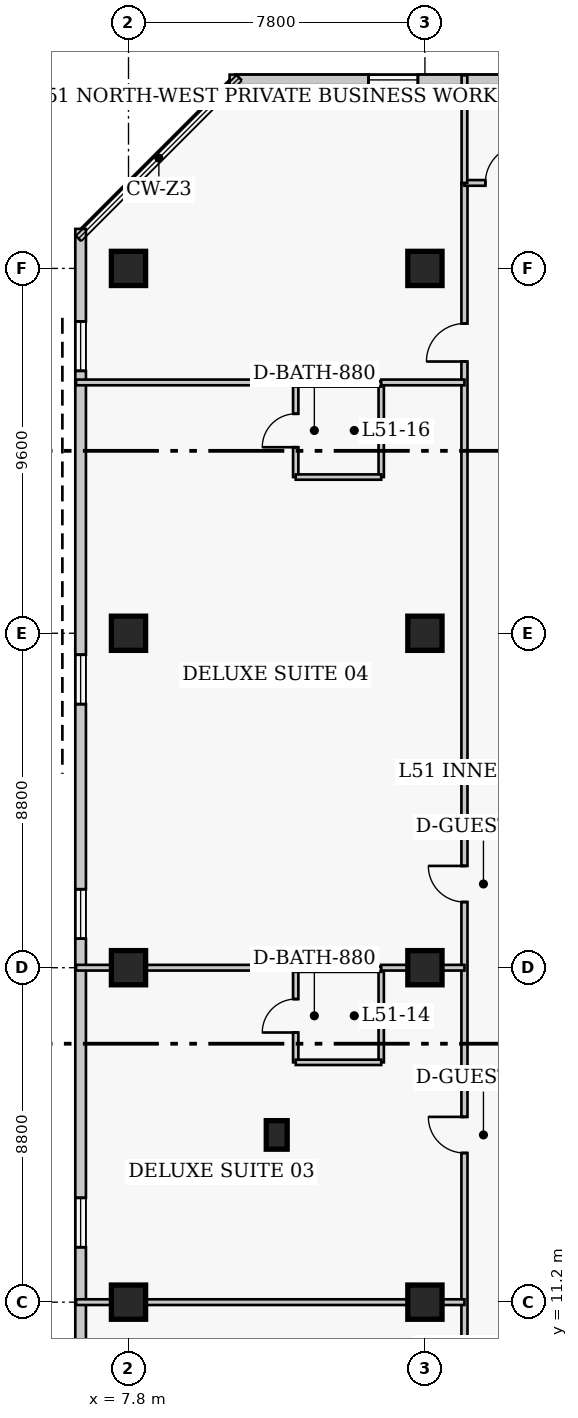
"""IFC4 building model, lengths in metres.
Left out: names, types, materials, properties, quantities, classifications, styles, units other than length and angle.
Written with IfcOpenShell. Run it as: python <this file> out.ifc"""

import sys

from ifc_helpers import new_model, si_unit, direction, frame, frame_2d, origin, origin_2d, place, context, subcontext, project, spatial, rectangle, extrude, element, fill, save


model = new_model("IFC4")
c1 = context("Model", 3, precision=1e-05, world=origin(), true_north=direction((0.0, 1.0)))
c2 = subcontext(c1, "Body", "Model", "MODEL_VIEW")
j1 = project(units=[si_unit("LENGTHUNIT", "METRE"), si_unit("PLANEANGLEUNIT", "RADIAN")], contexts=[c1])
p1 = place(None, origin())
s1 = spatial("IfcSite", under=j1, at=p1, CompositionType="ELEMENT")
p2 = place(p1, origin())
s2 = spatial("IfcBuilding", under=s1, at=p2, CompositionType="ELEMENT")
p3 = place(p2, frame((0.0, 0.0, 204.6)))
s3 = spatial("IfcBuildingStorey", under=s2, at=p3, CompositionType="ELEMENT", Elevation=204.6)
for number, where, z_axis, x_axis in (
    (1, (7.8, 11.2, 0.0), (0.0, 0.0, 1.0), (1.0, 0.0, 0.0)),
    (2, (7.8, 20.0, 0.0), (0.0, 0.0, 1.0), (1.0, 0.0, 0.0)),
    (3, (7.8, 28.8, 0.0), (0.0, 0.0, 1.0), (1.0, 0.0, 0.0)),
    (4, (7.8, 38.4, 0.0), (0.0, 0.0, 1.0), (1.0, 0.0, 0.0)),
    (5, (15.6, 11.2, 0.0), (0.0, 0.0, 1.0), (1.0, 0.0, 0.0)),
    (6, (15.6, 20.0, 0.0), (0.0, 0.0, 1.0), (1.0, 0.0, 0.0)),
    (7, (15.6, 28.8, 0.0), (0.0, 0.0, 1.0), (1.0, 0.0, 0.0)),
    (8, (15.6, 38.4, 0.0), (0.0, 0.0, 1.0), (1.0, 0.0, 0.0)),
):
    element("IfcColumn", number, at=place(p3, frame(where, z_axis=z_axis, x_axis=x_axis)), inside=s3, PredefinedType="COLUMN", context=c2, shape_type="SweptSolid", body=[
        extrude(rectangle(XDim=0.9, YDim=0.9, at=origin_2d()), origin(), (0.0, 0.0, 1.0), 3.9),
    ])
p4 = place(p3, frame((11.7, 15.6, 0.0), z_axis=(0.0, 0.0, 1.0), x_axis=(1.0, 0.0, 0.0)))
e9 = element("IfcColumn", 9, at=p4, inside=s3, PredefinedType="PILASTER", context=c2, shape_type="SweptSolid", body=[
    extrude(rectangle(XDim=0.55, YDim=0.75, at=origin_2d()), origin(), (0.0, 0.0, 1.0), 3.9),
])
p5 = place(p3, frame((36.29, 43.36, 0.0), z_axis=(0.0, 0.0, 1.0), x_axis=(-1.0, 0.0, 0.0)))
e10 = element("IfcWall", 10, at=p5, inside=s3, PredefinedType="SOLIDWALL", context=c2, shape_type="SweptSolid", body=[
    extrude(rectangle(XDim=25.83, YDim=0.28, at=frame_2d((12.915, 0.0))), origin(), (0.0, 0.0, 1.0), 3.65),
])
p6 = place(p5, frame((3.005, 0.0, 0.85)))
e11 = element("IfcOpeningElement", 11, at=p6, cuts=e10, PredefinedType="OPENING", context=c2, shape_type="SweptSolid", body=[
    extrude(rectangle(XDim=1.3, YDim=1.7, at=frame_2d((0.65, 0.85))), frame((0.0, 0.15, 0.0), z_axis=(0.0, -1.0, 0.0), x_axis=(1.0, 0.0, 0.0)), (0.0, 0.0, 1.0), 0.3),
])
p7 = place(p5, frame((12.265, 0.0, 0.85)))
e12 = element("IfcOpeningElement", 12, at=p7, cuts=e10, PredefinedType="OPENING", context=c2, shape_type="SweptSolid", body=[
    extrude(rectangle(XDim=1.3, YDim=1.7, at=frame_2d((0.65, 0.85))), frame((0.0, 0.15, 0.0), z_axis=(0.0, -1.0, 0.0), x_axis=(1.0, 0.0, 0.0)), (0.0, 0.0, 1.0), 0.3),
])
p8 = place(p5, frame((20.875, 0.0, 0.85)))
e13 = element("IfcOpeningElement", 13, at=p8, cuts=e10, PredefinedType="OPENING", context=c2, shape_type="SweptSolid", body=[
    extrude(rectangle(XDim=1.3, YDim=1.7, at=frame_2d((0.65, 0.85))), frame((0.0, 0.15, 0.0), z_axis=(0.0, -1.0, 0.0), x_axis=(1.0, 0.0, 0.0)), (0.0, 0.0, 1.0), 0.3),
])
p9 = place(p3, frame((6.54, 39.44, 0.0), z_axis=(0.0, 0.0, 1.0), x_axis=(0.0, -1.0, 0.0)))
e14 = element("IfcWall", 14, at=p9, inside=s3, PredefinedType="SOLIDWALL", context=c2, shape_type="SweptSolid", body=[
    extrude(rectangle(XDim=29.88, YDim=0.28, at=frame_2d((14.94, 0.0))), origin(), (0.0, 0.0, 1.0), 3.65),
])
p10 = place(p9, frame((2.435, 0.0, 0.85)))
e15 = element("IfcOpeningElement", 15, at=p10, cuts=e14, PredefinedType="OPENING", context=c2, shape_type="SweptSolid", body=[
    extrude(rectangle(XDim=1.3, YDim=1.7, at=frame_2d((0.65, 0.85))), frame((0.0, 0.15, 0.0), z_axis=(0.0, -1.0, 0.0), x_axis=(1.0, 0.0, 0.0)), (0.0, 0.0, 1.0), 0.3),
])
p11 = place(p9, frame((11.205, 0.0, 0.85)))
e16 = element("IfcOpeningElement", 16, at=p11, cuts=e14, PredefinedType="OPENING", context=c2, shape_type="SweptSolid", body=[
    extrude(rectangle(XDim=1.3, YDim=1.7, at=frame_2d((0.65, 0.85))), frame((0.0, 0.15, 0.0), z_axis=(0.0, -1.0, 0.0), x_axis=(1.0, 0.0, 0.0)), (0.0, 0.0, 1.0), 0.3),
])
p12 = place(p9, frame((17.375, 0.0, 0.85)))
e17 = element("IfcOpeningElement", 17, at=p12, cuts=e14, PredefinedType="OPENING", context=c2, shape_type="SweptSolid", body=[
    extrude(rectangle(XDim=1.3, YDim=1.7, at=frame_2d((0.65, 0.85))), frame((0.0, 0.15, 0.0), z_axis=(0.0, -1.0, 0.0), x_axis=(1.0, 0.0, 0.0)), (0.0, 0.0, 1.0), 0.3),
])
p13 = place(p9, frame((25.495, 0.0, 0.85)))
e18 = element("IfcOpeningElement", 18, at=p13, cuts=e14, PredefinedType="OPENING", context=c2, shape_type="SweptSolid", body=[
    extrude(rectangle(XDim=1.3, YDim=1.7, at=frame_2d((0.65, 0.85))), frame((0.0, 0.15, 0.0), z_axis=(0.0, -1.0, 0.0), x_axis=(1.0, 0.0, 0.0)), (0.0, 0.0, 1.0), 0.3),
])
p14 = place(p3, frame((16.64, 7.55, 0.0), z_axis=(0.0, 0.0, 1.0), x_axis=(0.0, 1.0, 0.0)))
e19 = element("IfcWall", 19, at=p14, inside=s3, PredefinedType="PARTITIONING", context=c2, shape_type="SweptSolid", body=[
    extrude(rectangle(XDim=33.1, YDim=0.16, at=frame_2d((16.55, 0.0))), origin(), (0.0, 0.0, 1.0), 3.65),
])
p15 = place(p14, frame((0.46, 0.0, 0.0)))
e20 = element("IfcOpeningElement", 20, at=p15, cuts=e19, PredefinedType="OPENING", context=c2, shape_type="SweptSolid", body=[
    extrude(rectangle(XDim=0.95, YDim=2.1, at=frame_2d((0.475, 1.05))), frame((0.0, 0.09, 0.0), z_axis=(0.0, -1.0, 0.0), x_axis=(1.0, 0.0, 0.0)), (0.0, 0.0, 1.0), 0.18),
])
p16 = place(p14, frame((7.575, 0.0, 0.0)))
e21 = element("IfcOpeningElement", 21, at=p16, cuts=e19, PredefinedType="OPENING", context=c2, shape_type="SweptSolid", body=[
    extrude(rectangle(XDim=0.95, YDim=2.1, at=frame_2d((0.475, 1.05))), frame((0.0, 0.09, 0.0), z_axis=(0.0, -1.0, 0.0), x_axis=(1.0, 0.0, 0.0)), (0.0, 0.0, 1.0), 0.18),
])
p17 = place(p14, frame((14.178, 0.0, 0.0)))
e22 = element("IfcOpeningElement", 22, at=p17, cuts=e19, PredefinedType="OPENING", context=c2, shape_type="SweptSolid", body=[
    extrude(rectangle(XDim=0.95, YDim=2.1, at=frame_2d((0.475, 1.05))), frame((0.0, 0.09, 0.0), z_axis=(0.0, -1.0, 0.0), x_axis=(1.0, 0.0, 0.0)), (0.0, 0.0, 1.0), 0.18),
])
p18 = place(p14, frame((28.4, 0.0, 0.0)))
e23 = element("IfcOpeningElement", 23, at=p18, cuts=e19, PredefinedType="OPENING", context=c2, shape_type="SweptSolid", body=[
    extrude(rectangle(XDim=1.0, YDim=2.15, at=frame_2d((0.5, 1.075))), frame((0.0, 0.09, 0.0), z_axis=(0.0, -1.0, 0.0), x_axis=(1.0, 0.0, 0.0)), (0.0, 0.0, 1.0), 0.18),
])
p19 = place(p3, frame((16.64, 40.65, 0.0), z_axis=(0.0, 0.0, 1.0), x_axis=(1.0, 0.0, 0.0)))
e24 = element("IfcWall", 24, at=p19, inside=s3, PredefinedType="PARTITIONING", context=c2, shape_type="SweptSolid", body=[
    extrude(rectangle(XDim=5.46, YDim=0.15, at=frame_2d((2.73, 0.0))), origin(), (0.0, 0.0, 1.0), 3.65),
])
p20 = place(p19, frame((0.55, 0.0, 0.0)))
e25 = element("IfcOpeningElement", 25, at=p20, cuts=e24, PredefinedType="OPENING", context=c2, shape_type="SweptSolid", body=[
    extrude(rectangle(XDim=1.0, YDim=2.15, at=frame_2d((0.5, 1.075))), frame((0.0, 0.085, 0.0), z_axis=(0.0, -1.0, 0.0), x_axis=(1.0, 0.0, 0.0)), (0.0, 0.0, 1.0), 0.17),
])
p21 = place(p3, frame((16.64, 40.65, 0.0), z_axis=(0.0, 0.0, 1.0), x_axis=(0.0, 1.0, 0.0)))
e26 = element("IfcWall", 26, at=p21, inside=s3, PredefinedType="PARTITIONING", context=c2, shape_type="SweptSolid", body=[
    extrude(rectangle(XDim=2.83, YDim=0.15, at=frame_2d((1.415, 0.0))), origin(), (0.0, 0.0, 1.0), 3.65),
])
p22 = place(p3, frame((6.42, 11.2, 0.0), z_axis=(0.0, 0.0, 1.0), x_axis=(1.0, 0.0, 0.0)))
e27 = element("IfcWall", 27, at=p22, inside=s3, PredefinedType="PARTITIONING", context=c2, shape_type="SweptSolid", body=[
    extrude(rectangle(XDim=10.22, YDim=0.15, at=frame_2d((5.11, 0.0))), origin(), (0.0, 0.0, 1.0), 2.878),
])
p23 = place(p3, frame((12.2, 17.51, 0.0), z_axis=(0.0, 0.0, 1.0), x_axis=(0.0, 1.0, 0.0)))
e28 = element("IfcWall", 28, at=p23, inside=s3, PredefinedType="PLUMBINGWALL", context=c2, shape_type="SweptSolid", body=[
    extrude(rectangle(XDim=2.45, YDim=0.14, at=frame_2d((1.225, 0.0))), origin(), (0.0, 0.0, 1.0), 3.65),
])
p24 = place(p23, frame((0.785, 0.0, 0.0)))
e29 = element("IfcOpeningElement", 29, at=p24, cuts=e28, PredefinedType="OPENING", context=c2, shape_type="SweptSolid", body=[
    extrude(rectangle(XDim=0.88, YDim=2.05, at=frame_2d((0.44, 1.025))), frame((0.0, 0.08, 0.0), z_axis=(0.0, -1.0, 0.0), x_axis=(1.0, 0.0, 0.0)), (0.0, 0.0, 1.0), 0.16),
])
p25 = place(p3, frame((14.45, 17.51, 0.0), z_axis=(0.0, 0.0, 1.0), x_axis=(0.0, 1.0, 0.0)))
e30 = element("IfcWall", 30, at=p25, inside=s3, PredefinedType="PLUMBINGWALL", context=c2, shape_type="SweptSolid", body=[
    extrude(rectangle(XDim=2.45, YDim=0.14, at=frame_2d((1.225, 0.0))), origin(), (0.0, 0.0, 1.0), 3.65),
])
p26 = place(p3, frame((12.2, 17.51, 0.0), z_axis=(0.0, 0.0, 1.0), x_axis=(1.0, 0.0, 0.0)))
e31 = element("IfcWall", 31, at=p26, inside=s3, PredefinedType="PLUMBINGWALL", context=c2, shape_type="SweptSolid", body=[
    extrude(rectangle(XDim=2.25, YDim=0.14, at=frame_2d((1.125, 0.0))), origin(), (0.0, 0.0, 1.0), 3.65),
])
p27 = place(p3, frame((12.2, 19.96, 0.0), z_axis=(0.0, 0.0, 1.0), x_axis=(1.0, 0.0, 0.0)))
e32 = element("IfcWall", 32, at=p27, inside=s3, PredefinedType="PLUMBINGWALL", context=c2, shape_type="SweptSolid", body=[
    extrude(rectangle(XDim=2.25, YDim=0.14, at=frame_2d((1.125, 0.0))), origin(), (0.0, 0.0, 1.0), 3.038),
])
p28 = place(p3, frame((6.42, 20.0, 0.0), z_axis=(0.0, 0.0, 1.0), x_axis=(1.0, 0.0, 0.0)))
e33 = element("IfcWall", 33, at=p28, inside=s3, PredefinedType="PARTITIONING", context=c2, shape_type="SweptSolid", body=[
    extrude(rectangle(XDim=5.78, YDim=0.15, at=frame_2d((2.89, 0.0))), origin(), (0.0, 0.0, 1.0), 2.878),
])
p29 = place(p3, frame((14.45, 20.0, 0.0), z_axis=(0.0, 0.0, 1.0), x_axis=(1.0, 0.0, 0.0)))
e34 = element("IfcWall", 34, at=p29, inside=s3, PredefinedType="PARTITIONING", context=c2, shape_type="SweptSolid", body=[
    extrude(rectangle(XDim=2.19, YDim=0.15, at=frame_2d((1.095, 0.0))), origin(), (0.0, 0.0, 1.0), 2.878),
])
p30 = place(p3, frame((12.2, 32.91, 0.0), z_axis=(0.0, 0.0, 1.0), x_axis=(0.0, 1.0, 0.0)))
e35 = element("IfcWall", 35, at=p30, inside=s3, PredefinedType="PLUMBINGWALL", context=c2, shape_type="SweptSolid", body=[
    extrude(rectangle(XDim=2.45, YDim=0.14, at=frame_2d((1.225, 0.0))), origin(), (0.0, 0.0, 1.0), 3.65),
])
p31 = place(p30, frame((0.785, 0.0, 0.0)))
e36 = element("IfcOpeningElement", 36, at=p31, cuts=e35, PredefinedType="OPENING", context=c2, shape_type="SweptSolid", body=[
    extrude(rectangle(XDim=0.88, YDim=2.05, at=frame_2d((0.44, 1.025))), frame((0.0, 0.08, 0.0), z_axis=(0.0, -1.0, 0.0), x_axis=(1.0, 0.0, 0.0)), (0.0, 0.0, 1.0), 0.16),
])
p32 = place(p3, frame((14.45, 32.91, 0.0), z_axis=(0.0, 0.0, 1.0), x_axis=(0.0, 1.0, 0.0)))
e37 = element("IfcWall", 37, at=p32, inside=s3, PredefinedType="PLUMBINGWALL", context=c2, shape_type="SweptSolid", body=[
    extrude(rectangle(XDim=2.45, YDim=0.14, at=frame_2d((1.225, 0.0))), origin(), (0.0, 0.0, 1.0), 3.65),
])
for number, where, z_axis, x_axis in (
    (38, (12.2, 32.91, 0.0), (0.0, 0.0, 1.0), (1.0, 0.0, 0.0)),
    (39, (12.2, 35.36, 0.0), (0.0, 0.0, 1.0), (1.0, 0.0, 0.0)),
):
    element("IfcWall", number, at=place(p3, frame(where, z_axis=z_axis, x_axis=x_axis)), inside=s3, PredefinedType="PLUMBINGWALL", context=c2, shape_type="SweptSolid", body=[
        extrude(rectangle(XDim=2.25, YDim=0.14, at=frame_2d((1.125, 0.0))), origin(), (0.0, 0.0, 1.0), 3.65),
    ])
p33 = place(p3, frame((6.42, 35.4, 0.0), z_axis=(0.0, 0.0, 1.0), x_axis=(1.0, 0.0, 0.0)))
e40 = element("IfcWall", 40, at=p33, inside=s3, PredefinedType="PARTITIONING", context=c2, shape_type="SweptSolid", body=[
    extrude(rectangle(XDim=5.78, YDim=0.15, at=frame_2d((2.89, 0.0))), origin(), (0.0, 0.0, 1.0), 3.65),
])
p34 = place(p3, frame((14.45, 35.4, 0.0), z_axis=(0.0, 0.0, 1.0), x_axis=(1.0, 0.0, 0.0)))
e41 = element("IfcWall", 41, at=p34, inside=s3, PredefinedType="PARTITIONING", context=c2, shape_type="SweptSolid", body=[
    extrude(rectangle(XDim=2.19, YDim=0.15, at=frame_2d((1.095, 0.0))), origin(), (0.0, 0.0, 1.0), 3.65),
])
p35 = place(p8, origin())
e42 = element("IfcWindow", 42, at=p35, inside=s3, PartitioningType="SINGLE_PANEL", PredefinedType="WINDOW", context=c2, shape_type="SweptSolid", body=[
    extrude(rectangle(XDim=1.3, YDim=1.7, at=frame_2d((0.65, 0.85))), frame((0.0, 0.03, 0.0), z_axis=(0.0, -1.0, 0.0), x_axis=(1.0, 0.0, 0.0)), (0.0, 0.0, 1.0), 0.06),
])
fill(e13, e42)
p36 = place(p10, origin())
e43 = element("IfcWindow", 43, at=p36, inside=s3, PartitioningType="SINGLE_PANEL", PredefinedType="WINDOW", context=c2, shape_type="SweptSolid", body=[
    extrude(rectangle(XDim=1.3, YDim=1.7, at=frame_2d((0.65, 0.85))), frame((0.0, 0.03, 0.0), z_axis=(0.0, -1.0, 0.0), x_axis=(1.0, 0.0, 0.0)), (0.0, 0.0, 1.0), 0.06),
])
fill(e15, e43)
p37 = place(p11, origin())
e44 = element("IfcWindow", 44, at=p37, inside=s3, PartitioningType="SINGLE_PANEL", PredefinedType="WINDOW", context=c2, shape_type="SweptSolid", body=[
    extrude(rectangle(XDim=1.3, YDim=1.7, at=frame_2d((0.65, 0.85))), frame((0.0, 0.03, 0.0), z_axis=(0.0, -1.0, 0.0), x_axis=(1.0, 0.0, 0.0)), (0.0, 0.0, 1.0), 0.06),
])
fill(e16, e44)
p38 = place(p12, origin())
e45 = element("IfcWindow", 45, at=p38, inside=s3, PartitioningType="SINGLE_PANEL", PredefinedType="WINDOW", context=c2, shape_type="SweptSolid", body=[
    extrude(rectangle(XDim=1.3, YDim=1.7, at=frame_2d((0.65, 0.85))), frame((0.0, 0.03, 0.0), z_axis=(0.0, -1.0, 0.0), x_axis=(1.0, 0.0, 0.0)), (0.0, 0.0, 1.0), 0.06),
])
fill(e17, e45)
p39 = place(p13, origin())
e46 = element("IfcWindow", 46, at=p39, inside=s3, PartitioningType="SINGLE_PANEL", PredefinedType="WINDOW", context=c2, shape_type="SweptSolid", body=[
    extrude(rectangle(XDim=1.3, YDim=1.7, at=frame_2d((0.65, 0.85))), frame((0.0, 0.03, 0.0), z_axis=(0.0, -1.0, 0.0), x_axis=(1.0, 0.0, 0.0)), (0.0, 0.0, 1.0), 0.06),
])
fill(e18, e46)
p40 = place(p20, origin())
e47 = element("IfcDoor", 47, at=p40, inside=s3, OperationType="SINGLE_SWING_RIGHT", PredefinedType="DOOR", context=c2, shape_type="SweptSolid", body=[
    extrude(rectangle(XDim=1.0, YDim=2.15, at=frame_2d((0.5, 1.075))), frame((0.0, 0.025, 0.0), z_axis=(0.0, -1.0, 0.0), x_axis=(1.0, 0.0, 0.0)), (0.0, 0.0, 1.0), 0.05),
])
fill(e25, e47)
p41 = place(p24, origin())
e48 = element("IfcDoor", 48, at=p41, inside=s3, OperationType="SINGLE_SWING_LEFT", PredefinedType="DOOR", context=c2, shape_type="SweptSolid", body=[
    extrude(rectangle(XDim=0.88, YDim=2.05, at=frame_2d((0.44, 1.025))), frame((0.0, 0.025, 0.0), z_axis=(0.0, -1.0, 0.0), x_axis=(1.0, 0.0, 0.0)), (0.0, 0.0, 1.0), 0.05),
])
fill(e29, e48)
p42 = place(p16, origin())
e49 = element("IfcDoor", 49, at=p42, inside=s3, OperationType="SINGLE_SWING_RIGHT", PredefinedType="DOOR", context=c2, shape_type="SweptSolid", body=[
    extrude(rectangle(XDim=0.95, YDim=2.1, at=frame_2d((0.475, 1.05))), frame((0.0, 0.025, 0.0), z_axis=(0.0, -1.0, 0.0), x_axis=(1.0, 0.0, 0.0)), (0.0, 0.0, 1.0), 0.05),
])
fill(e21, e49)
p43 = place(p31, origin())
e50 = element("IfcDoor", 50, at=p43, inside=s3, OperationType="SINGLE_SWING_LEFT", PredefinedType="DOOR", context=c2, shape_type="SweptSolid", body=[
    extrude(rectangle(XDim=0.88, YDim=2.05, at=frame_2d((0.44, 1.025))), frame((0.0, 0.025, 0.0), z_axis=(0.0, -1.0, 0.0), x_axis=(1.0, 0.0, 0.0)), (0.0, 0.0, 1.0), 0.05),
])
fill(e36, e50)
p44 = place(p17, origin())
e51 = element("IfcDoor", 51, at=p44, inside=s3, OperationType="SINGLE_SWING_RIGHT", PredefinedType="DOOR", context=c2, shape_type="SweptSolid", body=[
    extrude(rectangle(XDim=0.95, YDim=2.1, at=frame_2d((0.475, 1.05))), frame((0.0, 0.025, 0.0), z_axis=(0.0, -1.0, 0.0), x_axis=(1.0, 0.0, 0.0)), (0.0, 0.0, 1.0), 0.05),
])
fill(e22, e51)
p45 = place(p18, origin())
e52 = element("IfcDoor", 52, at=p45, inside=s3, OperationType="SINGLE_SWING_LEFT", PredefinedType="DOOR", context=c2, shape_type="SweptSolid", body=[
    extrude(rectangle(XDim=1.0, YDim=2.15, at=frame_2d((0.5, 1.075))), frame((0.0, 0.025, 0.0), z_axis=(0.0, -1.0, 0.0), x_axis=(1.0, 0.0, 0.0)), (0.0, 0.0, 1.0), 0.05),
])
fill(e23, e52)
save(model, sys.argv[1])
